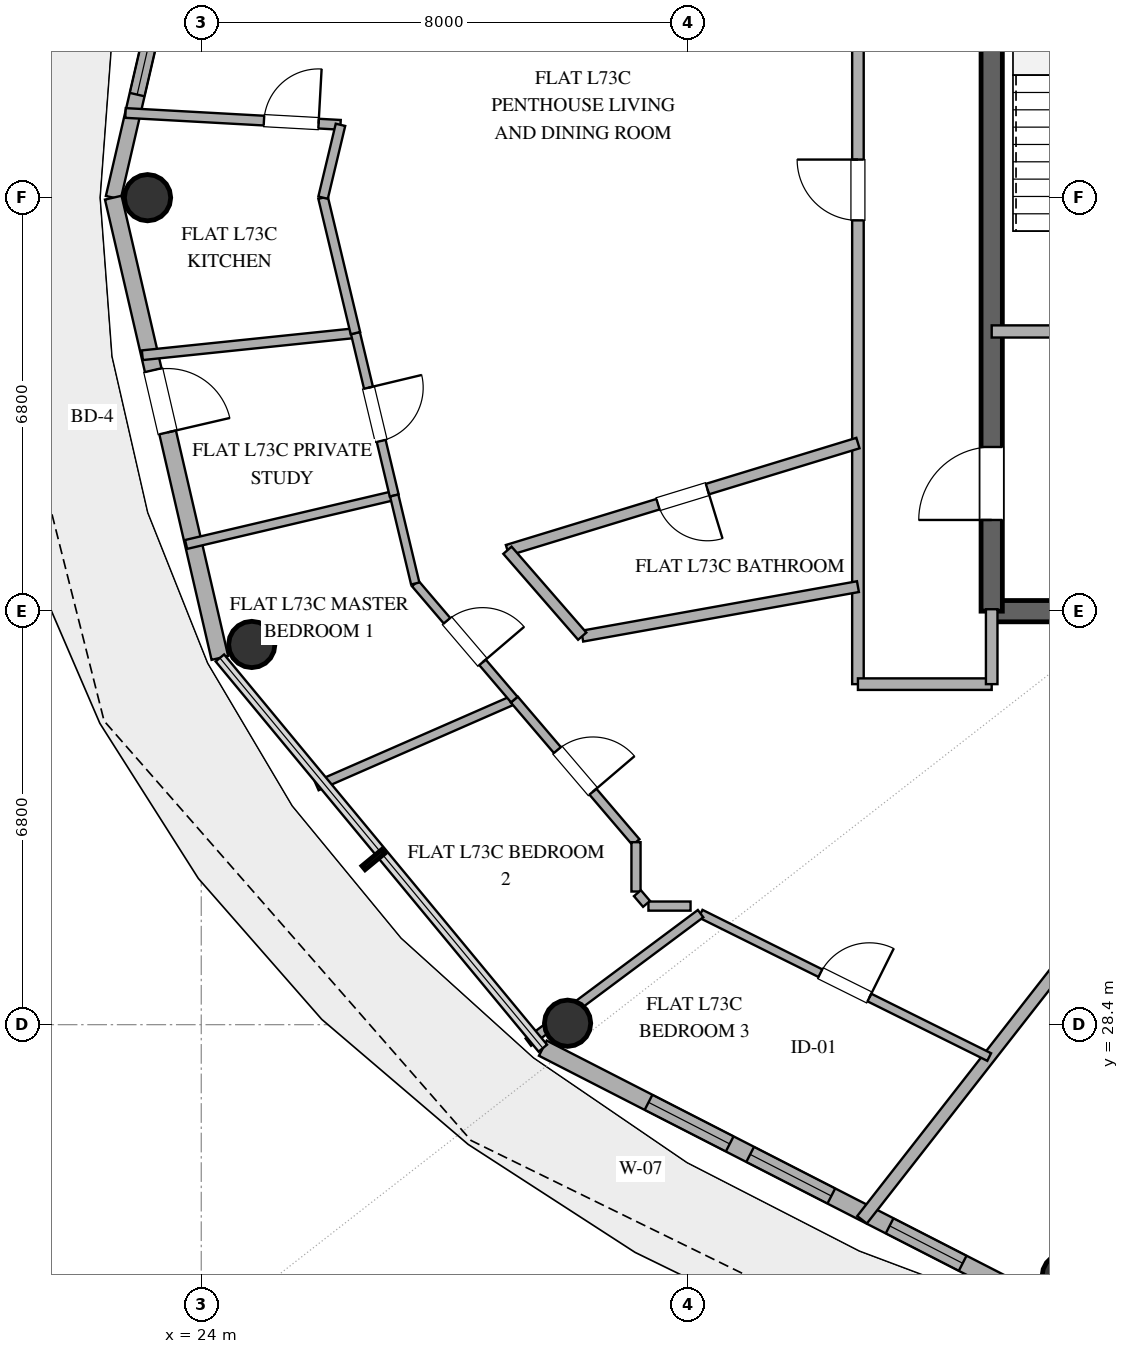
"""IFC4 building model, lengths in metres.
Left out: names, types, materials, properties, quantities, classifications, styles, units other than length and angle.
Written with IfcOpenShell. Run it as: python <this file> out.ifc"""

import sys

from ifc_helpers import new_model, si_unit, direction, frame, frame_2d, origin, origin_2d, place, context, subcontext, project, spatial, rectangle, hollow_circle, extrude, element, fill, save


model = new_model("IFC4")
c1 = context("Model", 3, precision=1e-05, world=origin(), true_north=direction((0.0, 1.0)))
c2 = subcontext(c1, "Body", "Model", "MODEL_VIEW")
j1 = project(units=[si_unit("LENGTHUNIT", "METRE"), si_unit("PLANEANGLEUNIT", "RADIAN")], contexts=[c1])
p1 = place(None, origin())
s1 = spatial("IfcSite", under=j1, at=p1, CompositionType="ELEMENT")
p2 = place(p1, origin())
s2 = spatial("IfcBuilding", under=s1, at=p2, CompositionType="ELEMENT")
p3 = place(p2, frame((0.0, 0.0, 283.8)))
s3 = spatial("IfcBuildingStorey", under=s2, at=p3, CompositionType="ELEMENT", Elevation=283.8)
p4 = place(p3, frame((37.0, 35.2, 0.0), z_axis=(0.0, 0.0, 1.0), x_axis=(1.0, 0.0, 0.0)))
e1 = element("IfcWall", 1, at=p4, inside=s3, PredefinedType="SHEAR", context=c2, shape_type="SweptSolid", body=[
    extrude(rectangle(XDim=4.0, YDim=0.35, at=frame_2d((2.0, 0.0))), origin(), (0.0, 0.0, 1.0), 3.37),
])
p5 = place(p3, frame((37.0, 35.2, 0.0), z_axis=(0.0, 0.0, 1.0), x_axis=(0.0, 1.0, 0.0)))
e2 = element("IfcWall", 2, at=p5, inside=s3, PredefinedType="SHEAR", context=c2, shape_type="SweptSolid", body=[
    extrude(rectangle(XDim=13.6, YDim=0.35, at=frame_2d((6.8, 0.0))), origin(), (0.0, 0.0, 1.0), 3.37),
])
p6 = place(p5, frame((1.5, 0.0, 0.0)))
e3 = element("IfcOpeningElement", 3, at=p6, cuts=e2, PredefinedType="OPENING", context=c2, shape_type="SweptSolid", body=[
    extrude(rectangle(XDim=1.2, YDim=2.15, at=frame_2d((0.6, 1.075))), frame((0.0, 0.185, 0.0), z_axis=(0.0, -1.0, 0.0), x_axis=(1.0, 0.0, 0.0)), (0.0, 0.0, 1.0), 0.37),
])
for number, where, z_axis, x_axis in (
    (4, (23.117, 42.0, 0.0), (0.0, 0.0, 1.0), (1.0, 0.0, 0.0)),
    (5, (24.831, 34.653, 0.0), (0.0, 0.0, 1.0), (1.0, 0.0, 0.0)),
    (6, (30.025, 28.424, 0.0), (0.0, 0.0, 1.0), (1.0, 0.0, 0.0)),
    (7, (38.209, 24.261, 0.0), (0.0, 0.0, 1.0), (1.0, 0.0, 0.0)),
):
    element("IfcColumn", number, at=place(p3, frame(where, z_axis=z_axis, x_axis=x_axis)), inside=s3, PredefinedType="COLUMN", context=c2, shape_type="SweptSolid", body=[
        extrude(hollow_circle(Radius=0.381, WallThickness=0.025, at=origin_2d()), origin(), (0.0, 0.0, 1.0), 3.37),
    ])
p7 = place(p3, frame((24.306, 49.57, 0.0), z_axis=(0.0, 0.0, 1.0), x_axis=(-0.225635078214, -0.974211892495, 0.0)))
e8 = element("IfcWall", 8, at=p7, inside=s3, PredefinedType="SOLIDWALL", context=c2, shape_type="SweptSolid", body=[
    extrude(rectangle(XDim=7.77, YDim=0.25, at=frame_2d((3.885, 0.0))), origin(), (0.0, 0.0, 1.0), 3.37),
])
p8 = place(p7, frame((5.03, 0.0, 1.42)))
e9 = element("IfcOpeningElement", 9, at=p8, cuts=e8, PredefinedType="OPENING", context=c2, shape_type="SweptSolid", body=[
    extrude(rectangle(XDim=1.0, YDim=1.05, at=frame_2d((0.5, 0.525))), frame((0.0, 0.135, 0.0), z_axis=(0.0, -1.0, 0.0), x_axis=(1.0, 0.0, 0.0)), (0.0, 0.0, 1.0), 0.27),
])
p9 = place(p3, frame((22.553, 42.0, 0.0), z_axis=(0.0, 0.0, 1.0), x_axis=(0.225635078214, -0.974211892495, 0.0)))
e10 = element("IfcWall", 10, at=p9, inside=s3, PredefinedType="SOLIDWALL", context=c2, shape_type="SweptSolid", body=[
    extrude(rectangle(XDim=7.77, YDim=0.28, at=frame_2d((3.885, 0.0))), origin(), (0.0, 0.0, 1.0), 3.37),
])
p10 = place(p9, frame((2.912, 0.0, 0.0)))
e11 = element("IfcOpeningElement", 11, at=p10, cuts=e10, PredefinedType="OPENING", context=c2, shape_type="SweptSolid", body=[
    extrude(rectangle(XDim=1.05, YDim=2.2, at=frame_2d((0.525, 1.1))), frame((0.0, 0.15, 0.0), z_axis=(0.0, -1.0, 0.0), x_axis=(1.0, 0.0, 0.0)), (0.0, 0.0, 1.0), 0.3),
])
p11 = place(p3, frame((29.617, 28.013, 0.0), z_axis=(0.0, 0.0, 1.0), x_axis=(0.890007394051, -0.455946091699, 0.0)))
e12 = element("IfcWall", 12, at=p11, inside=s3, PredefinedType="SOLIDWALL", context=c2, shape_type="SweptSolid", body=[
    extrude(rectangle(XDim=9.404, YDim=0.28, at=frame_2d((4.702, 0.0))), origin(), (0.0, 0.0, 1.0), 3.37),
])
p12 = place(p11, frame((1.954, 0.0, 0.85)))
e13 = element("IfcOpeningElement", 13, at=p12, cuts=e12, PredefinedType="OPENING", context=c2, shape_type="SweptSolid", body=[
    extrude(rectangle(XDim=1.5, YDim=1.8, at=frame_2d((0.75, 0.9))), frame((0.0, 0.15, 0.0), z_axis=(0.0, -1.0, 0.0), x_axis=(1.0, 0.0, 0.0)), (0.0, 0.0, 1.0), 0.3),
])
p13 = place(p11, frame((3.831, 0.0, 0.85)))
e14 = element("IfcOpeningElement", 14, at=p13, cuts=e12, PredefinedType="OPENING", context=c2, shape_type="SweptSolid", body=[
    extrude(rectangle(XDim=1.5, YDim=1.8, at=frame_2d((0.75, 0.9))), frame((0.0, 0.15, 0.0), z_axis=(0.0, -1.0, 0.0), x_axis=(1.0, 0.0, 0.0)), (0.0, 0.0, 1.0), 0.3),
])
p14 = place(p11, frame((6.408, 0.0, 0.85)))
e15 = element("IfcOpeningElement", 15, at=p14, cuts=e12, PredefinedType="OPENING", context=c2, shape_type="SweptSolid", body=[
    extrude(rectangle(XDim=1.35, YDim=1.8, at=frame_2d((0.675, 0.9))), frame((0.0, 0.15, 0.0), z_axis=(0.0, -1.0, 0.0), x_axis=(1.0, 0.0, 0.0)), (0.0, 0.0, 1.0), 0.3),
])
p15 = place(p3, frame((37.0, 39.8, 0.0), z_axis=(0.0, 0.0, 1.0), x_axis=(1.0, 0.0, 0.0)))
e16 = element("IfcWall", 16, at=p15, inside=s3, PredefinedType="SOLIDWALL", context=c2, shape_type="SweptSolid", body=[
    extrude(rectangle(XDim=4.0, YDim=0.2, at=frame_2d((2.0, 0.0))), origin(), (0.0, 0.0, 1.0), 2.73),
])
p16 = place(p15, frame((1.45, 0.0, 0.0)))
e17 = element("IfcOpeningElement", 17, at=p16, cuts=e16, PredefinedType="OPENING", context=c2, shape_type="SweptSolid", body=[
    extrude(rectangle(XDim=1.1, YDim=2.15, at=frame_2d((0.55, 1.075))), frame((0.0, 0.11, 0.0), z_axis=(0.0, -1.0, 0.0), x_axis=(1.0, 0.0, 0.0)), (0.0, 0.0, 1.0), 0.22),
])
p17 = place(p3, frame((42.687, 35.2, 0.0), z_axis=(0.0, 0.0, 1.0), x_axis=(-0.615663811723, -0.788008928208, 0.0)))
e18 = element("IfcWall", 18, at=p17, inside=s3, PredefinedType="PARTITIONING", context=c2, shape_type="SweptSolid", body=[
    extrude(rectangle(XDim=12.701, YDim=0.2, at=frame_2d((6.351, 0.0))), origin(), (0.0, 0.0, 1.0), 2.73),
])
p18 = place(p3, frame((34.8, 34.0, 0.0), z_axis=(0.0, 0.0, 1.0), x_axis=(0.0, 1.0, 0.0)))
e19 = element("IfcWall", 19, at=p18, inside=s3, PredefinedType="PARTITIONING", context=c2, shape_type="SweptSolid", body=[
    extrude(rectangle(XDim=16.9, YDim=0.19, at=frame_2d((8.45, 0.0))), origin(), (0.0, 0.0, 1.0), 2.73),
])
p19 = place(p18, frame((7.627, 0.0, 0.0)))
e20 = element("IfcOpeningElement", 20, at=p19, cuts=e19, PredefinedType="OPENING", context=c2, shape_type="SweptSolid", body=[
    extrude(rectangle(XDim=1.0, YDim=2.2, at=frame_2d((0.5, 1.1))), frame((0.0, 0.105, 0.0), z_axis=(0.0, -1.0, 0.0), x_axis=(1.0, 0.0, 0.0)), (0.0, 0.0, 1.0), 0.21),
])
p20 = place(p3, frame((34.8, 37.964, 0.0), z_axis=(0.0, 0.0, 1.0), x_axis=(-0.956308169094, -0.292360540641, 0.0)))
e21 = element("IfcWall", 21, at=p20, inside=s3, PredefinedType="PLUMBINGWALL", context=c2, shape_type="SweptSolid", body=[
    extrude(rectangle(XDim=6.028, YDim=0.18, at=frame_2d((3.014, 0.0))), origin(), (0.0, 0.0, 1.0), 2.73),
])
p21 = place(p20, frame((2.589, 0.0, 0.0)))
e22 = element("IfcOpeningElement", 22, at=p21, cuts=e21, PredefinedType="OPENING", context=c2, shape_type="SweptSolid", body=[
    extrude(rectangle(XDim=0.85, YDim=2.1, at=frame_2d((0.425, 1.05))), frame((0.0, 0.1, 0.0), z_axis=(0.0, -1.0, 0.0), x_axis=(1.0, 0.0, 0.0)), (0.0, 0.0, 1.0), 0.2),
])
p22 = place(p3, frame((32.212, 30.226, 0.0), z_axis=(0.0, 0.0, 1.0), x_axis=(0.895575883974, -0.444908795197, 0.0)))
e23 = element("IfcWall", 23, at=p22, inside=s3, PredefinedType="PARTITIONING", context=c2, shape_type="SweptSolid", body=[
    extrude(rectangle(XDim=5.3, YDim=0.14, at=frame_2d((2.65, 0.0))), origin(), (0.0, 0.0, 1.0), 2.73),
])
p23 = place(p22, frame((2.2, 0.0, 0.0)))
e24 = element("IfcOpeningElement", 24, at=p23, cuts=e23, PredefinedType="OPENING", context=c2, shape_type="SweptSolid", body=[
    extrude(rectangle(XDim=0.9, YDim=2.1, at=frame_2d((0.45, 1.05))), frame((0.0, 0.08, 0.0), z_axis=(0.0, -1.0, 0.0), x_axis=(1.0, 0.0, 0.0)), (0.0, 0.0, 1.0), 0.16),
])
p24 = place(p3, frame((30.265, 34.789, 0.0), z_axis=(0.0, 0.0, 1.0), x_axis=(0.984250881723, 0.176777266148, 0.0)))
e25 = element("IfcWall", 25, at=p24, inside=s3, PredefinedType="PLUMBINGWALL", context=c2, shape_type="SweptSolid", body=[
    extrude(rectangle(XDim=4.607, YDim=0.18, at=frame_2d((2.304, 0.0))), origin(), (0.0, 0.0, 1.0), 2.73),
])
p25 = place(p3, frame((29.148, 33.746, 0.0), z_axis=(0.0, 0.0, 1.0), x_axis=(-0.916054593567, -0.401053589442, 0.0)))
e26 = element("IfcWall", 26, at=p25, inside=s3, PredefinedType="PARTITIONING", context=c2, shape_type="SweptSolid", body=[
    extrude(rectangle(XDim=3.546, YDim=0.15, at=frame_2d((1.773, 0.0))), origin(), (0.0, 0.0, 1.0), 2.73),
])
p26 = place(p3, frame((22.754, 43.393, 0.0), z_axis=(0.0, 0.0, 1.0), x_axis=(0.998481285203, -0.055091951307, 0.0)))
e27 = element("IfcWall", 27, at=p26, inside=s3, PredefinedType="PLUMBINGWALL", context=c2, shape_type="SweptSolid", body=[
    extrude(rectangle(XDim=3.541, YDim=0.16, at=frame_2d((1.771, 0.0))), origin(), (0.0, 0.0, 1.0), 2.73),
])
p27 = place(p26, frame((2.281, 0.0, 0.0)))
e28 = element("IfcOpeningElement", 28, at=p27, cuts=e27, PredefinedType="OPENING", context=c2, shape_type="SweptSolid", body=[
    extrude(rectangle(XDim=0.9, YDim=2.1, at=frame_2d((0.45, 1.05))), frame((0.0, 0.09, 0.0), z_axis=(0.0, -1.0, 0.0), x_axis=(1.0, 0.0, 0.0)), (0.0, 0.0, 1.0), 0.18),
])
p28 = place(p3, frame((32.212, 30.226, 0.0), z_axis=(0.0, 0.0, 1.0), x_axis=(-0.801630280955, -0.597820117306, 0.0)))
e29 = element("IfcWall", 29, at=p28, inside=s3, PredefinedType="PARTITIONING", context=c2, shape_type="SweptSolid", body=[
    extrude(rectangle(XDim=3.534, YDim=0.15, at=frame_2d((1.767, 0.0))), origin(), (0.0, 0.0, 1.0), 2.73),
])
p29 = place(p3, frame((26.536, 39.773, 0.0), z_axis=(0.0, 0.0, 1.0), x_axis=(-0.994663387729, -0.103173374039, 0.0)))
e30 = element("IfcWall", 30, at=p29, inside=s3, PredefinedType="PLUMBINGWALL", context=c2, shape_type="SweptSolid", body=[
    extrude(rectangle(XDim=3.523, YDim=0.16, at=frame_2d((1.762, 0.0))), origin(), (0.0, 0.0, 1.0), 2.73),
])
p30 = place(p3, frame((27.174, 37.102, 0.0), z_axis=(0.0, 0.0, 1.0), x_axis=(-0.973445389286, -0.228919361518, 0.0)))
e31 = element("IfcWall", 31, at=p30, inside=s3, PredefinedType="PARTITIONING", context=c2, shape_type="SweptSolid", body=[
    extrude(rectangle(XDim=3.516, YDim=0.15, at=frame_2d((1.758, 0.0))), origin(), (0.0, 0.0, 1.0), 2.73),
])
p31 = place(p3, frame((29.148, 33.746, 0.0), z_axis=(0.0, 0.0, 1.0), x_axis=(0.649198693287, -0.760618864238, 0.0)))
e32 = element("IfcWall", 32, at=p31, inside=s3, PredefinedType="PARTITIONING", context=c2, shape_type="SweptSolid", body=[
    extrude(rectangle(XDim=3.083, YDim=0.15, at=frame_2d((1.542, 0.0))), origin(), (0.0, 0.0, 1.0), 2.73),
])
p32 = place(p31, frame((1.092, 0.0, 0.0)))
e33 = element("IfcOpeningElement", 33, at=p32, cuts=e32, PredefinedType="OPENING", context=c2, shape_type="SweptSolid", body=[
    extrude(rectangle(XDim=0.9, YDim=2.1, at=frame_2d((0.45, 1.05))), frame((0.0, 0.085, 0.0), z_axis=(0.0, -1.0, 0.0), x_axis=(1.0, 0.0, 0.0)), (0.0, 0.0, 1.0), 0.17),
])
p33 = place(p3, frame((26.536, 39.773, 0.0), z_axis=(0.0, 0.0, 1.0), x_axis=(0.232333689401, -0.97263613791, 0.0)))
e34 = element("IfcWall", 34, at=p33, inside=s3, PredefinedType="PARTITIONING", context=c2, shape_type="SweptSolid", body=[
    extrude(rectangle(XDim=2.746, YDim=0.15, at=frame_2d((1.373, 0.0))), origin(), (0.0, 0.0, 1.0), 2.73),
])
p34 = place(p33, frame((0.923, 0.0, 0.0)))
e35 = element("IfcOpeningElement", 35, at=p34, cuts=e34, PredefinedType="OPENING", context=c2, shape_type="SweptSolid", body=[
    extrude(rectangle(XDim=0.9, YDim=2.1, at=frame_2d((0.45, 1.05))), frame((0.0, 0.085, 0.0), z_axis=(0.0, -1.0, 0.0), x_axis=(1.0, 0.0, 0.0)), (0.0, 0.0, 1.0), 0.17),
])
p35 = place(p3, frame((27.519, 35.655, 0.0), z_axis=(0.0, 0.0, 1.0), x_axis=(0.649219833228, -0.760600820499, 0.0)))
e36 = element("IfcWall", 36, at=p35, inside=s3, PredefinedType="PARTITIONING", context=c2, shape_type="SweptSolid", body=[
    extrude(rectangle(XDim=2.51, YDim=0.14, at=frame_2d((1.255, 0.0))), origin(), (0.0, 0.0, 1.0), 2.73),
])
p36 = place(p35, frame((0.805, 0.0, 0.0)))
e37 = element("IfcOpeningElement", 37, at=p36, cuts=e36, PredefinedType="OPENING", context=c2, shape_type="SweptSolid", body=[
    extrude(rectangle(XDim=0.9, YDim=2.1, at=frame_2d((0.45, 1.05))), frame((0.0, 0.08, 0.0), z_axis=(0.0, -1.0, 0.0), x_axis=(1.0, 0.0, 0.0)), (0.0, 0.0, 1.0), 0.16),
])
p37 = place(p3, frame((26.004, 42.0, 0.0), z_axis=(0.0, 0.0, 1.0), x_axis=(0.232312317028, -0.972641242883, 0.0)))
e38 = element("IfcWall", 38, at=p37, inside=s3, PredefinedType="PLUMBINGWALL", context=c2, shape_type="SweptSolid", body=[
    extrude(rectangle(XDim=2.29, YDim=0.16, at=frame_2d((1.145, 0.0))), origin(), (0.0, 0.0, 1.0), 2.73),
])
p38 = place(p3, frame((37.0, 34.0, 0.0), z_axis=(0.0, 0.0, 1.0), x_axis=(-1.0, 0.0, 0.0)))
e39 = element("IfcWall", 39, at=p38, inside=s3, PredefinedType="PARTITIONING", context=c2, shape_type="SweptSolid", body=[
    extrude(rectangle(XDim=2.2, YDim=0.19, at=frame_2d((1.1, 0.0))), origin(), (0.0, 0.0, 1.0), 2.73),
])
p39 = place(p3, frame((29.036, 36.202, 0.0), z_axis=(0.0, 0.0, 1.0), x_axis=(0.656333580006, -0.754470828963, 0.0)))
e40 = element("IfcWall", 40, at=p39, inside=s3, PredefinedType="PLUMBINGWALL", context=c2, shape_type="SweptSolid", body=[
    extrude(rectangle(XDim=1.873, YDim=0.18, at=frame_2d((0.937, 0.0))), origin(), (0.0, 0.0, 1.0), 2.73),
])
p40 = place(p3, frame((27.174, 37.102, 0.0), z_axis=(0.0, 0.0, 1.0), x_axis=(0.232212116671, -0.972665169969, 0.0)))
e41 = element("IfcWall", 41, at=p40, inside=s3, PredefinedType="PARTITIONING", context=c2, shape_type="SweptSolid", body=[
    extrude(rectangle(XDim=1.488, YDim=0.14, at=frame_2d((0.744, 0.0))), origin(), (0.0, 0.0, 1.0), 2.73),
])
p41 = place(p3, frame((37.0, 35.232, 0.0), z_axis=(0.0, 0.0, 1.0), x_axis=(0.0, -1.0, 0.0)))
e42 = element("IfcWall", 42, at=p41, inside=s3, PredefinedType="PARTITIONING", context=c2, shape_type="SweptSolid", body=[
    extrude(rectangle(XDim=1.232, YDim=0.19, at=frame_2d((0.616, 0.0))), origin(), (0.0, 0.0, 1.0), 2.73),
])
p42 = place(p3, frame((26.29, 43.198, 0.0), z_axis=(0.0, 0.0, 1.0), x_axis=(-0.232308267809, -0.972642210017, 0.0)))
e43 = element("IfcWall", 43, at=p42, inside=s3, PredefinedType="PLUMBINGWALL", context=c2, shape_type="SweptSolid", body=[
    extrude(rectangle(XDim=1.232, YDim=0.16, at=frame_2d((0.616, 0.0))), origin(), (0.0, 0.0, 1.0), 2.73),
])
p43 = place(p3, frame((31.15, 31.401, 0.0), z_axis=(0.0, 0.0, 1.0), x_axis=(0.0, -1.0, 0.0)))
e44 = element("IfcWall", 44, at=p43, inside=s3, PredefinedType="PARTITIONING", context=c2, shape_type="SweptSolid", body=[
    extrude(rectangle(XDim=0.812, YDim=0.15, at=frame_2d((0.406, 0.0))), origin(), (0.0, 0.0, 1.0), 2.73),
])
p44 = place(p3, frame((31.354, 30.35, 0.0), z_axis=(0.0, 0.0, 1.0), x_axis=(1.0, 0.0, 0.0)))
e45 = element("IfcWall", 45, at=p44, inside=s3, PredefinedType="PARTITIONING", context=c2, shape_type="SweptSolid", body=[
    extrude(rectangle(XDim=0.693, YDim=0.15, at=frame_2d((0.346, 0.0))), origin(), (0.0, 0.0, 1.0), 2.73),
])
p45 = place(p3, frame((31.173, 30.562, 0.0), z_axis=(0.0, 0.0, 1.0), x_axis=(0.648874632887, -0.760895334981, 0.0)))
e46 = element("IfcWall", 46, at=p45, inside=s3, PredefinedType="PARTITIONING", context=c2, shape_type="SweptSolid", body=[
    extrude(rectangle(XDim=0.231, YDim=0.15, at=frame_2d((0.115, 0.0))), origin(), (0.0, 0.0, 1.0), 2.73),
])
p46 = place(p10, origin())
e47 = element("IfcDoor", 47, at=p46, inside=s3, OperationType="SINGLE_SWING_RIGHT", PredefinedType="DOOR", context=c2, shape_type="SweptSolid", body=[
    extrude(rectangle(XDim=1.05, YDim=2.2, at=frame_2d((0.525, 1.1))), frame((0.0, 0.025, 0.0), z_axis=(0.0, -1.0, 0.0), x_axis=(1.0, 0.0, 0.0)), (0.0, 0.0, 1.0), 0.05),
])
fill(e11, e47)
p47 = place(p12, origin())
e48 = element("IfcWindow", 48, at=p47, inside=s3, PartitioningType="SINGLE_PANEL", PredefinedType="WINDOW", context=c2, shape_type="SweptSolid", body=[
    extrude(rectangle(XDim=1.5, YDim=1.8, at=frame_2d((0.75, 0.9))), frame((0.0, 0.03, 0.0), z_axis=(0.0, -1.0, 0.0), x_axis=(1.0, 0.0, 0.0)), (0.0, 0.0, 1.0), 0.06),
])
fill(e13, e48)
p48 = place(p13, origin())
e49 = element("IfcWindow", 49, at=p48, inside=s3, PartitioningType="SINGLE_PANEL", PredefinedType="WINDOW", context=c2, shape_type="SweptSolid", body=[
    extrude(rectangle(XDim=1.5, YDim=1.8, at=frame_2d((0.75, 0.9))), frame((0.0, 0.03, 0.0), z_axis=(0.0, -1.0, 0.0), x_axis=(1.0, 0.0, 0.0)), (0.0, 0.0, 1.0), 0.06),
])
fill(e14, e49)
p49 = place(p14, origin())
e50 = element("IfcWindow", 50, at=p49, inside=s3, PartitioningType="SINGLE_PANEL", PredefinedType="WINDOW", context=c2, shape_type="SweptSolid", body=[
    extrude(rectangle(XDim=1.35, YDim=1.8, at=frame_2d((0.675, 0.9))), frame((0.0, 0.03, 0.0), z_axis=(0.0, -1.0, 0.0), x_axis=(1.0, 0.0, 0.0)), (0.0, 0.0, 1.0), 0.06),
])
fill(e15, e50)
p50 = place(p8, origin())
e51 = element("IfcWindow", 51, at=p50, inside=s3, PartitioningType="SINGLE_PANEL", PredefinedType="WINDOW", context=c2, shape_type="SweptSolid", body=[
    extrude(rectangle(XDim=1.0, YDim=1.05, at=frame_2d((0.5, 0.525))), frame((0.0, 0.03, 0.0), z_axis=(0.0, -1.0, 0.0), x_axis=(1.0, 0.0, 0.0)), (0.0, 0.0, 1.0), 0.06),
])
fill(e9, e51)
p51 = place(p6, origin())
e52 = element("IfcDoor", 52, at=p51, inside=s3, OperationType="SINGLE_SWING_LEFT", PredefinedType="DOOR", context=c2, shape_type="SweptSolid", body=[
    extrude(rectangle(XDim=1.2, YDim=2.15, at=frame_2d((0.6, 1.075))), frame((0.0, 0.025, 0.0), z_axis=(0.0, -1.0, 0.0), x_axis=(1.0, 0.0, 0.0)), (0.0, 0.0, 1.0), 0.05),
])
fill(e3, e52)
p52 = place(p19, origin())
e53 = element("IfcDoor", 53, at=p52, inside=s3, OperationType="SINGLE_SWING_RIGHT", PredefinedType="DOOR", context=c2, shape_type="SweptSolid", body=[
    extrude(rectangle(XDim=1.0, YDim=2.2, at=frame_2d((0.5, 1.1))), frame((0.0, 0.025, 0.0), z_axis=(0.0, -1.0, 0.0), x_axis=(1.0, 0.0, 0.0)), (0.0, 0.0, 1.0), 0.05),
])
fill(e20, e53)
p53 = place(p21, origin())
e54 = element("IfcDoor", 54, at=p53, inside=s3, OperationType="SINGLE_SWING_LEFT", PredefinedType="DOOR", context=c2, shape_type="SweptSolid", body=[
    extrude(rectangle(XDim=0.85, YDim=2.1, at=frame_2d((0.425, 1.05))), frame((0.0, 0.025, 0.0), z_axis=(0.0, -1.0, 0.0), x_axis=(1.0, 0.0, 0.0)), (0.0, 0.0, 1.0), 0.05),
])
fill(e22, e54)
p54 = place(p23, origin())
e55 = element("IfcDoor", 55, at=p54, inside=s3, OperationType="SINGLE_SWING_RIGHT", PredefinedType="DOOR", context=c2, shape_type="SweptSolid", body=[
    extrude(rectangle(XDim=0.9, YDim=2.1, at=frame_2d((0.45, 1.05))), frame((0.0, 0.025, 0.0), z_axis=(0.0, -1.0, 0.0), x_axis=(1.0, 0.0, 0.0)), (0.0, 0.0, 1.0), 0.05),
])
fill(e24, e55)
p55 = place(p27, origin())
e56 = element("IfcDoor", 56, at=p55, inside=s3, OperationType="SINGLE_SWING_RIGHT", PredefinedType="DOOR", context=c2, shape_type="SweptSolid", body=[
    extrude(rectangle(XDim=0.9, YDim=2.1, at=frame_2d((0.45, 1.05))), frame((0.0, 0.025, 0.0), z_axis=(0.0, -1.0, 0.0), x_axis=(1.0, 0.0, 0.0)), (0.0, 0.0, 1.0), 0.05),
])
fill(e28, e56)
p56 = place(p32, origin())
e57 = element("IfcDoor", 57, at=p56, inside=s3, OperationType="SINGLE_SWING_RIGHT", PredefinedType="DOOR", context=c2, shape_type="SweptSolid", body=[
    extrude(rectangle(XDim=0.9, YDim=2.1, at=frame_2d((0.45, 1.05))), frame((0.0, 0.025, 0.0), z_axis=(0.0, -1.0, 0.0), x_axis=(1.0, 0.0, 0.0)), (0.0, 0.0, 1.0), 0.05),
])
fill(e33, e57)
p57 = place(p34, origin())
e58 = element("IfcDoor", 58, at=p57, inside=s3, OperationType="SINGLE_SWING_LEFT", PredefinedType="DOOR", context=c2, shape_type="SweptSolid", body=[
    extrude(rectangle(XDim=0.9, YDim=2.1, at=frame_2d((0.45, 1.05))), frame((0.0, 0.025, 0.0), z_axis=(0.0, -1.0, 0.0), x_axis=(1.0, 0.0, 0.0)), (0.0, 0.0, 1.0), 0.05),
])
fill(e35, e58)
p58 = place(p36, origin())
e59 = element("IfcDoor", 59, at=p58, inside=s3, OperationType="SINGLE_SWING_RIGHT", PredefinedType="DOOR", context=c2, shape_type="SweptSolid", body=[
    extrude(rectangle(XDim=0.9, YDim=2.1, at=frame_2d((0.45, 1.05))), frame((0.0, 0.025, 0.0), z_axis=(0.0, -1.0, 0.0), x_axis=(1.0, 0.0, 0.0)), (0.0, 0.0, 1.0), 0.05),
])
fill(e37, e59)
save(model, sys.argv[1])
